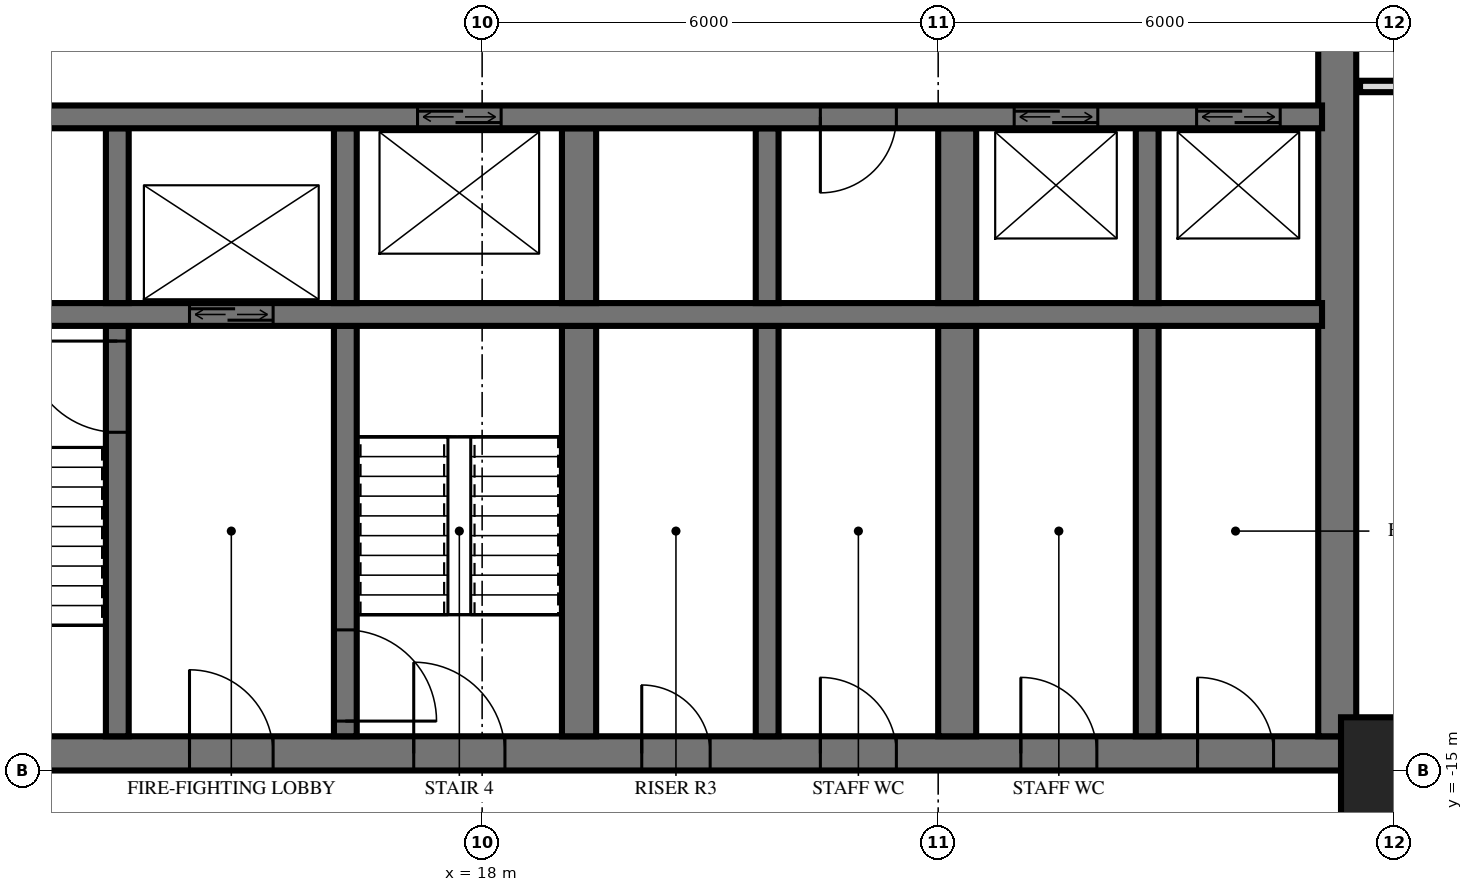
"""IFC4 building model, lengths in metres.
Left out: names, types, materials, properties, quantities, classifications, styles, units other than length and angle.
Written with IfcOpenShell. Run it as: python <this file> out.ifc"""

import sys

from ifc_helpers import new_model, si_unit, direction, frame, frame_2d, origin, origin_2d, place, context, subcontext, project, spatial, rectangle, extrude, element, fill, save


model = new_model("IFC4")
c1 = context("Model", 3, precision=1e-05, world=origin(), true_north=direction((0.0, 1.0)))
c2 = subcontext(c1, "Body", "Model", "MODEL_VIEW")
j1 = project(units=[si_unit("LENGTHUNIT", "METRE"), si_unit("PLANEANGLEUNIT", "RADIAN")], contexts=[c1])
p1 = place(None, origin())
s1 = spatial("IfcSite", under=j1, at=p1, CompositionType="ELEMENT")
p2 = place(p1, origin())
s2 = spatial("IfcBuilding", under=s1, at=p2, CompositionType="ELEMENT")
p3 = place(p2, frame((0.0, 0.0, 52.8)))
s3 = spatial("IfcBuildingStorey", under=s2, at=p3, CompositionType="ELEMENT", Elevation=52.8)
p4 = place(p3, frame((30.0, -15.0, 0.0), z_axis=(0.0, 0.0, 1.0), x_axis=(1.0, 0.0, 0.0)))
e1 = element("IfcColumn", 1, at=p4, inside=s3, PredefinedType="COLUMN", context=c2, shape_type="SweptSolid", body=[
    extrude(rectangle(XDim=1.4, YDim=1.4, at=origin_2d()), origin(), (0.0, 0.0, 1.0), 3.6),
])
p5 = place(p3, frame((10.0, -14.775, 0.0), z_axis=(0.0, 0.0, 1.0), x_axis=(1.0, 0.0, 0.0)))
e2 = element("IfcWall", 2, at=p5, inside=s3, PredefinedType="SHEAR", context=c2, shape_type="SweptSolid", body=[
    extrude(rectangle(XDim=19.5, YDim=0.45, at=frame_2d((9.75, 0.0))), origin(), (0.0, 0.0, 1.0), 3.6),
])
p6 = place(p5, frame((7.1, 0.0, 0.0)))
e3 = element("IfcOpeningElement", 3, at=p6, cuts=e2, PredefinedType="OPENING", context=c2, shape_type="SweptSolid", body=[
    extrude(rectangle(XDim=1.2, YDim=2.1, at=frame_2d((0.6, 1.05))), frame((0.0, 0.235, 0.0), z_axis=(0.0, -1.0, 0.0), x_axis=(1.0, 0.0, 0.0)), (0.0, 0.0, 1.0), 0.47),
])
p7 = place(p5, frame((4.15, 0.0, 0.0)))
e4 = element("IfcOpeningElement", 4, at=p7, cuts=e2, PredefinedType="OPENING", context=c2, shape_type="SweptSolid", body=[
    extrude(rectangle(XDim=1.1, YDim=2.1, at=frame_2d((0.55, 1.05))), frame((0.0, 0.235, 0.0), z_axis=(0.0, -1.0, 0.0), x_axis=(1.0, 0.0, 0.0)), (0.0, 0.0, 1.0), 0.47),
])
p8 = place(p5, frame((10.1, 0.0, 0.0)))
e5 = element("IfcOpeningElement", 5, at=p8, cuts=e2, PredefinedType="OPENING", context=c2, shape_type="SweptSolid", body=[
    extrude(rectangle(XDim=0.9, YDim=2.1, at=frame_2d((0.45, 1.05))), frame((0.0, 0.235, 0.0), z_axis=(0.0, -1.0, 0.0), x_axis=(1.0, 0.0, 0.0)), (0.0, 0.0, 1.0), 0.47),
])
p9 = place(p5, frame((12.45, 0.0, 0.0)))
e6 = element("IfcOpeningElement", 6, at=p9, cuts=e2, PredefinedType="OPENING", context=c2, shape_type="SweptSolid", body=[
    extrude(rectangle(XDim=1.0, YDim=2.1, at=frame_2d((0.5, 1.05))), frame((0.0, 0.235, 0.0), z_axis=(0.0, -1.0, 0.0), x_axis=(1.0, 0.0, 0.0)), (0.0, 0.0, 1.0), 0.47),
])
p10 = place(p5, frame((15.087, 0.0, 0.0)))
e7 = element("IfcOpeningElement", 7, at=p10, cuts=e2, PredefinedType="OPENING", context=c2, shape_type="SweptSolid", body=[
    extrude(rectangle(XDim=1.0, YDim=2.1, at=frame_2d((0.5, 1.05))), frame((0.0, 0.235, 0.0), z_axis=(0.0, -1.0, 0.0), x_axis=(1.0, 0.0, 0.0)), (0.0, 0.0, 1.0), 0.47),
])
p11 = place(p5, frame((17.413, 0.0, 0.0)))
e8 = element("IfcOpeningElement", 8, at=p11, cuts=e2, PredefinedType="OPENING", context=c2, shape_type="SweptSolid", body=[
    extrude(rectangle(XDim=1.0, YDim=2.1, at=frame_2d((0.5, 1.05))), frame((0.0, 0.235, 0.0), z_axis=(0.0, -1.0, 0.0), x_axis=(1.0, 0.0, 0.0)), (0.0, 0.0, 1.0), 0.47),
])
p12 = place(p3, frame((29.25, -14.55, 0.0), z_axis=(0.0, 0.0, 1.0), x_axis=(0.0, 1.0, 0.0)))
e9 = element("IfcWall", 9, at=p12, inside=s3, PredefinedType="SHEAR", context=c2, shape_type="SweptSolid", body=[
    extrude(rectangle(XDim=14.1, YDim=0.5, at=frame_2d((7.05, 0.0))), origin(), (0.0, 0.0, 1.0), 3.6),
])
p13 = place(p3, frame((10.35, -6.4, 0.0), z_axis=(0.0, 0.0, 1.0), x_axis=(1.0, 0.0, 0.0)))
e10 = element("IfcWall", 10, at=p13, inside=s3, PredefinedType="SHEAR", context=c2, shape_type="SweptSolid", body=[
    extrude(rectangle(XDim=18.7, YDim=0.3, at=frame_2d((9.35, 0.0))), origin(), (0.0, 0.0, 1.0), 3.6),
])
p14 = place(p13, frame((14.65, 0.0, 0.0)))
e11 = element("IfcOpeningElement", 11, at=p14, cuts=e10, PredefinedType="OPENING", context=c2, shape_type="SweptSolid", body=[
    extrude(rectangle(XDim=1.1, YDim=2.1, at=frame_2d((0.55, 1.05))), frame((0.0, 0.16, 0.0), z_axis=(0.0, -1.0, 0.0), x_axis=(1.0, 0.0, 0.0)), (0.0, 0.0, 1.0), 0.32),
])
p15 = place(p13, frame((17.05, 0.0, 0.0)))
e12 = element("IfcOpeningElement", 12, at=p15, cuts=e10, PredefinedType="OPENING", context=c2, shape_type="SweptSolid", body=[
    extrude(rectangle(XDim=1.1, YDim=2.1, at=frame_2d((0.55, 1.05))), frame((0.0, 0.16, 0.0), z_axis=(0.0, -1.0, 0.0), x_axis=(1.0, 0.0, 0.0)), (0.0, 0.0, 1.0), 0.32),
])
p16 = place(p13, frame((6.8, 0.0, 0.0)))
e13 = element("IfcOpeningElement", 13, at=p16, cuts=e10, PredefinedType="OPENING", context=c2, shape_type="SweptSolid", body=[
    extrude(rectangle(XDim=1.1, YDim=2.1, at=frame_2d((0.55, 1.05))), frame((0.0, 0.16, 0.0), z_axis=(0.0, -1.0, 0.0), x_axis=(1.0, 0.0, 0.0)), (0.0, 0.0, 1.0), 0.32),
])
p17 = place(p13, frame((12.1, 0.0, 0.0)))
e14 = element("IfcOpeningElement", 14, at=p17, cuts=e10, PredefinedType="OPENING", context=c2, shape_type="SweptSolid", body=[
    extrude(rectangle(XDim=1.0, YDim=2.1, at=frame_2d((0.5, 1.05))), frame((0.0, 0.16, 0.0), z_axis=(0.0, -1.0, 0.0), x_axis=(1.0, 0.0, 0.0)), (0.0, 0.0, 1.0), 0.32),
])
p18 = place(p3, frame((10.35, -9.0, 0.0), z_axis=(0.0, 0.0, 1.0), x_axis=(1.0, 0.0, 0.0)))
e15 = element("IfcWall", 15, at=p18, inside=s3, PredefinedType="SHEAR", context=c2, shape_type="SweptSolid", body=[
    extrude(rectangle(XDim=18.7, YDim=0.3, at=frame_2d((9.35, 0.0))), origin(), (0.0, 0.0, 1.0), 3.6),
])
p19 = place(p18, frame((3.8, 0.0, 0.0)))
e16 = element("IfcOpeningElement", 16, at=p19, cuts=e15, PredefinedType="OPENING", context=c2, shape_type="SweptSolid", body=[
    extrude(rectangle(XDim=1.1, YDim=2.1, at=frame_2d((0.55, 1.05))), frame((0.0, 0.16, 0.0), z_axis=(0.0, -1.0, 0.0), x_axis=(1.0, 0.0, 0.0)), (0.0, 0.0, 1.0), 0.32),
])
p20 = place(p3, frame((13.2, -8.85, 0.0), z_axis=(0.0, 0.0, 1.0), x_axis=(0.0, 1.0, 0.0)))
e17 = element("IfcWall", 17, at=p20, inside=s3, PredefinedType="SHEAR", context=c2, shape_type="SweptSolid", body=[
    extrude(rectangle(XDim=2.3, YDim=0.3, at=frame_2d((1.15, 0.0))), origin(), (0.0, 0.0, 1.0), 3.6),
])
p21 = place(p3, frame((13.2, -14.55, 0.0), z_axis=(0.0, 0.0, 1.0), x_axis=(0.0, 1.0, 0.0)))
e18 = element("IfcWall", 18, at=p21, inside=s3, PredefinedType="SHEAR", context=c2, shape_type="SweptSolid", body=[
    extrude(rectangle(XDim=5.4, YDim=0.3, at=frame_2d((2.7, 0.0))), origin(), (0.0, 0.0, 1.0), 3.6),
])
p22 = place(p21, frame((4.0, 0.0, 0.0)))
e19 = element("IfcOpeningElement", 19, at=p22, cuts=e18, PredefinedType="OPENING", context=c2, shape_type="SweptSolid", body=[
    extrude(rectangle(XDim=1.2, YDim=2.1, at=frame_2d((0.6, 1.05))), frame((0.0, 0.16, 0.0), z_axis=(0.0, -1.0, 0.0), x_axis=(1.0, 0.0, 0.0)), (0.0, 0.0, 1.0), 0.32),
])
p23 = place(p3, frame((16.2, -8.85, 0.0), z_axis=(0.0, 0.0, 1.0), x_axis=(0.0, 1.0, 0.0)))
e20 = element("IfcWall", 20, at=p23, inside=s3, PredefinedType="SHEAR", context=c2, shape_type="SweptSolid", body=[
    extrude(rectangle(XDim=2.3, YDim=0.3, at=frame_2d((1.15, 0.0))), origin(), (0.0, 0.0, 1.0), 3.6),
])
p24 = place(p3, frame((16.2, -14.55, 0.0), z_axis=(0.0, 0.0, 1.0), x_axis=(0.0, 1.0, 0.0)))
e21 = element("IfcWall", 21, at=p24, inside=s3, PredefinedType="SHEAR", context=c2, shape_type="SweptSolid", body=[
    extrude(rectangle(XDim=5.4, YDim=0.3, at=frame_2d((2.7, 0.0))), origin(), (0.0, 0.0, 1.0), 3.6),
])
p25 = place(p24, frame((0.2, 0.0, 0.0)))
e22 = element("IfcOpeningElement", 22, at=p25, cuts=e21, PredefinedType="OPENING", context=c2, shape_type="SweptSolid", body=[
    extrude(rectangle(XDim=1.2, YDim=2.1, at=frame_2d((0.6, 1.05))), frame((0.0, 0.16, 0.0), z_axis=(0.0, -1.0, 0.0), x_axis=(1.0, 0.0, 0.0)), (0.0, 0.0, 1.0), 0.32),
])
p26 = place(p3, frame((19.275, -8.85, 0.0), z_axis=(0.0, 0.0, 1.0), x_axis=(0.0, 1.0, 0.0)))
e23 = element("IfcWall", 23, at=p26, inside=s3, PredefinedType="SHEAR", context=c2, shape_type="SweptSolid", body=[
    extrude(rectangle(XDim=2.3, YDim=0.45, at=frame_2d((1.15, 0.0))), origin(), (0.0, 0.0, 1.0), 3.6),
])
p27 = place(p3, frame((19.275, -14.55, 0.0), z_axis=(0.0, 0.0, 1.0), x_axis=(0.0, 1.0, 0.0)))
e24 = element("IfcWall", 24, at=p27, inside=s3, PredefinedType="SHEAR", context=c2, shape_type="SweptSolid", body=[
    extrude(rectangle(XDim=5.4, YDim=0.45, at=frame_2d((2.7, 0.0))), origin(), (0.0, 0.0, 1.0), 3.6),
])
p28 = place(p3, frame((21.75, -8.85, 0.0), z_axis=(0.0, 0.0, 1.0), x_axis=(0.0, 1.0, 0.0)))
e25 = element("IfcWall", 25, at=p28, inside=s3, PredefinedType="SHEAR", context=c2, shape_type="SweptSolid", body=[
    extrude(rectangle(XDim=2.3, YDim=0.3, at=frame_2d((1.15, 0.0))), origin(), (0.0, 0.0, 1.0), 3.6),
])
p29 = place(p3, frame((21.75, -14.55, 0.0), z_axis=(0.0, 0.0, 1.0), x_axis=(0.0, 1.0, 0.0)))
e26 = element("IfcWall", 26, at=p29, inside=s3, PredefinedType="SHEAR", context=c2, shape_type="SweptSolid", body=[
    extrude(rectangle(XDim=5.4, YDim=0.3, at=frame_2d((2.7, 0.0))), origin(), (0.0, 0.0, 1.0), 3.6),
])
p30 = place(p3, frame((24.25, -8.85, 0.0), z_axis=(0.0, 0.0, 1.0), x_axis=(0.0, 1.0, 0.0)))
e27 = element("IfcWall", 27, at=p30, inside=s3, PredefinedType="SHEAR", context=c2, shape_type="SweptSolid", body=[
    extrude(rectangle(XDim=2.3, YDim=0.5, at=frame_2d((1.15, 0.0))), origin(), (0.0, 0.0, 1.0), 3.6),
])
p31 = place(p3, frame((24.25, -14.55, 0.0), z_axis=(0.0, 0.0, 1.0), x_axis=(0.0, 1.0, 0.0)))
e28 = element("IfcWall", 28, at=p31, inside=s3, PredefinedType="SHEAR", context=c2, shape_type="SweptSolid", body=[
    extrude(rectangle(XDim=5.4, YDim=0.5, at=frame_2d((2.7, 0.0))), origin(), (0.0, 0.0, 1.0), 3.6),
])
p32 = place(p3, frame((26.75, -8.85, 0.0), z_axis=(0.0, 0.0, 1.0), x_axis=(0.0, 1.0, 0.0)))
e29 = element("IfcWall", 29, at=p32, inside=s3, PredefinedType="SHEAR", context=c2, shape_type="SweptSolid", body=[
    extrude(rectangle(XDim=2.3, YDim=0.3, at=frame_2d((1.15, 0.0))), origin(), (0.0, 0.0, 1.0), 3.6),
])
p33 = place(p3, frame((26.75, -14.55, 0.0), z_axis=(0.0, 0.0, 1.0), x_axis=(0.0, 1.0, 0.0)))
e30 = element("IfcWall", 30, at=p33, inside=s3, PredefinedType="SHEAR", context=c2, shape_type="SweptSolid", body=[
    extrude(rectangle(XDim=5.4, YDim=0.3, at=frame_2d((2.7, 0.0))), origin(), (0.0, 0.0, 1.0), 3.6),
])
p34 = place(p3, frame((29.55, -15.0, 0.0), z_axis=(0.0, 0.0, 1.0), x_axis=(1.0, 0.0, 0.0)))
e31 = element("IfcWall", 31, at=p34, inside=s3, PredefinedType="PARTITIONING", context=c2, shape_type="SweptSolid", body=[
    extrude(rectangle(XDim=3.57, YDim=0.15, at=frame_2d((1.785, 0.0))), origin(), (0.0, 0.0, 1.0), 3.32),
])
p35 = place(p34, frame((1.205, 0.0, 0.0)))
e32 = element("IfcOpeningElement", 32, at=p35, cuts=e31, PredefinedType="OPENING", context=c2, shape_type="SweptSolid", body=[
    extrude(rectangle(XDim=0.8, YDim=2.1, at=frame_2d((0.4, 1.05))), frame((0.0, 0.085, 0.0), z_axis=(0.0, -1.0, 0.0), x_axis=(1.0, 0.0, 0.0)), (0.0, 0.0, 1.0), 0.17),
])
p36 = place(p3, frame((29.55, -6.0, 0.0), z_axis=(0.0, 0.0, 1.0), x_axis=(1.0, 0.0, 0.0)))
e33 = element("IfcWall", 33, at=p36, inside=s3, PredefinedType="PARTITIONING", context=c2, shape_type="SweptSolid", body=[
    extrude(rectangle(XDim=3.57, YDim=0.15, at=frame_2d((1.785, 0.0))), origin(), (0.0, 0.0, 1.0), 3.32),
])
p37 = place(p36, frame((1.4, 0.0, 0.0)))
e34 = element("IfcOpeningElement", 34, at=p37, cuts=e33, PredefinedType="OPENING", context=c2, shape_type="SweptSolid", body=[
    extrude(rectangle(XDim=0.9, YDim=2.1, at=frame_2d((0.45, 1.05))), frame((0.0, 0.085, 0.0), z_axis=(0.0, -1.0, 0.0), x_axis=(1.0, 0.0, 0.0)), (0.0, 0.0, 1.0), 0.17),
])
p38 = place(p14, origin())
e35 = element("IfcDoor", 35, at=p38, inside=s3, OperationType="DOUBLE_DOOR_SLIDING", PredefinedType="USERDEFINED", context=c2, shape_type="SweptSolid", body=[
    extrude(rectangle(XDim=1.1, YDim=2.1, at=frame_2d((0.55, 1.05))), frame((0.0, 0.025, 0.0), z_axis=(0.0, -1.0, 0.0), x_axis=(1.0, 0.0, 0.0)), (0.0, 0.0, 1.0), 0.05),
])
fill(e11, e35)
p39 = place(p15, origin())
e36 = element("IfcDoor", 36, at=p39, inside=s3, OperationType="DOUBLE_DOOR_SLIDING", PredefinedType="USERDEFINED", context=c2, shape_type="SweptSolid", body=[
    extrude(rectangle(XDim=1.1, YDim=2.1, at=frame_2d((0.55, 1.05))), frame((0.0, 0.025, 0.0), z_axis=(0.0, -1.0, 0.0), x_axis=(1.0, 0.0, 0.0)), (0.0, 0.0, 1.0), 0.05),
])
fill(e12, e36)
p40 = place(p19, origin())
e37 = element("IfcDoor", 37, at=p40, inside=s3, OperationType="DOUBLE_DOOR_SLIDING", PredefinedType="USERDEFINED", context=c2, shape_type="SweptSolid", body=[
    extrude(rectangle(XDim=1.1, YDim=2.1, at=frame_2d((0.55, 1.05))), frame((0.0, 0.025, 0.0), z_axis=(0.0, -1.0, 0.0), x_axis=(1.0, 0.0, 0.0)), (0.0, 0.0, 1.0), 0.05),
])
fill(e16, e37)
p41 = place(p16, origin())
e38 = element("IfcDoor", 38, at=p41, inside=s3, OperationType="DOUBLE_DOOR_SLIDING", PredefinedType="USERDEFINED", context=c2, shape_type="SweptSolid", body=[
    extrude(rectangle(XDim=1.1, YDim=2.1, at=frame_2d((0.55, 1.05))), frame((0.0, 0.025, 0.0), z_axis=(0.0, -1.0, 0.0), x_axis=(1.0, 0.0, 0.0)), (0.0, 0.0, 1.0), 0.05),
])
fill(e13, e38)
p42 = place(p6, origin())
e39 = element("IfcDoor", 39, at=p42, inside=s3, OperationType="SINGLE_SWING_RIGHT", PredefinedType="DOOR", context=c2, shape_type="SweptSolid", body=[
    extrude(rectangle(XDim=1.2, YDim=2.1, at=frame_2d((0.6, 1.05))), frame((0.0, 0.025, 0.0), z_axis=(0.0, -1.0, 0.0), x_axis=(1.0, 0.0, 0.0)), (0.0, 0.0, 1.0), 0.05),
])
fill(e3, e39)
p43 = place(p7, origin())
e40 = element("IfcDoor", 40, at=p43, inside=s3, OperationType="SINGLE_SWING_RIGHT", PredefinedType="DOOR", context=c2, shape_type="SweptSolid", body=[
    extrude(rectangle(XDim=1.1, YDim=2.1, at=frame_2d((0.55, 1.05))), frame((0.0, 0.025, 0.0), z_axis=(0.0, -1.0, 0.0), x_axis=(1.0, 0.0, 0.0)), (0.0, 0.0, 1.0), 0.05),
])
fill(e4, e40)
p44 = place(p8, origin())
e41 = element("IfcDoor", 41, at=p44, inside=s3, OperationType="SINGLE_SWING_RIGHT", PredefinedType="DOOR", context=c2, shape_type="SweptSolid", body=[
    extrude(rectangle(XDim=0.9, YDim=2.1, at=frame_2d((0.45, 1.05))), frame((0.0, 0.025, 0.0), z_axis=(0.0, -1.0, 0.0), x_axis=(1.0, 0.0, 0.0)), (0.0, 0.0, 1.0), 0.05),
])
fill(e5, e41)
p45 = place(p9, origin())
e42 = element("IfcDoor", 42, at=p45, inside=s3, OperationType="SINGLE_SWING_RIGHT", PredefinedType="DOOR", context=c2, shape_type="SweptSolid", body=[
    extrude(rectangle(XDim=1.0, YDim=2.1, at=frame_2d((0.5, 1.05))), frame((0.0, 0.025, 0.0), z_axis=(0.0, -1.0, 0.0), x_axis=(1.0, 0.0, 0.0)), (0.0, 0.0, 1.0), 0.05),
])
fill(e6, e42)
p46 = place(p10, origin())
e43 = element("IfcDoor", 43, at=p46, inside=s3, OperationType="SINGLE_SWING_RIGHT", PredefinedType="DOOR", context=c2, shape_type="SweptSolid", body=[
    extrude(rectangle(XDim=1.0, YDim=2.1, at=frame_2d((0.5, 1.05))), frame((0.0, 0.025, 0.0), z_axis=(0.0, -1.0, 0.0), x_axis=(1.0, 0.0, 0.0)), (0.0, 0.0, 1.0), 0.05),
])
fill(e7, e43)
p47 = place(p11, origin())
e44 = element("IfcDoor", 44, at=p47, inside=s3, OperationType="SINGLE_SWING_RIGHT", PredefinedType="DOOR", context=c2, shape_type="SweptSolid", body=[
    extrude(rectangle(XDim=1.0, YDim=2.1, at=frame_2d((0.5, 1.05))), frame((0.0, 0.025, 0.0), z_axis=(0.0, -1.0, 0.0), x_axis=(1.0, 0.0, 0.0)), (0.0, 0.0, 1.0), 0.05),
])
fill(e8, e44)
p48 = place(p17, frame((0.5, 0.0, 0.0), z_axis=(0.0, 0.0, 1.0), x_axis=(-1.0, 0.0, 0.0)))
e45 = element("IfcDoor", 45, at=p48, inside=s3, OperationType="SINGLE_SWING_LEFT", PredefinedType="DOOR", context=c2, shape_type="SweptSolid", body=[
    extrude(rectangle(XDim=1.0, YDim=2.1, at=frame_2d((0.0, 1.05))), frame((0.0, -0.025, 0.0), z_axis=(0.0, 1.0, 0.0), x_axis=(-1.0, 0.0, 0.0)), (0.0, 0.0, 1.0), 0.05),
])
fill(e14, e45)
p49 = place(p22, origin())
e46 = element("IfcDoor", 46, at=p49, inside=s3, OperationType="SINGLE_SWING_LEFT", PredefinedType="DOOR", context=c2, shape_type="SweptSolid", body=[
    extrude(rectangle(XDim=1.2, YDim=2.1, at=frame_2d((0.6, 1.05))), frame((0.0, 0.025, 0.0), z_axis=(0.0, -1.0, 0.0), x_axis=(1.0, 0.0, 0.0)), (0.0, 0.0, 1.0), 0.05),
])
fill(e19, e46)
p50 = place(p25, frame((0.6, 0.0, 0.0), z_axis=(0.0, 0.0, 1.0), x_axis=(-1.0, 0.0, 0.0)))
e47 = element("IfcDoor", 47, at=p50, inside=s3, OperationType="SINGLE_SWING_LEFT", PredefinedType="DOOR", context=c2, shape_type="SweptSolid", body=[
    extrude(rectangle(XDim=1.2, YDim=2.1, at=frame_2d((0.0, 1.05))), frame((0.0, -0.025, 0.0), z_axis=(0.0, 1.0, 0.0), x_axis=(-1.0, 0.0, 0.0)), (0.0, 0.0, 1.0), 0.05),
])
fill(e22, e47)
save(model, sys.argv[1])
